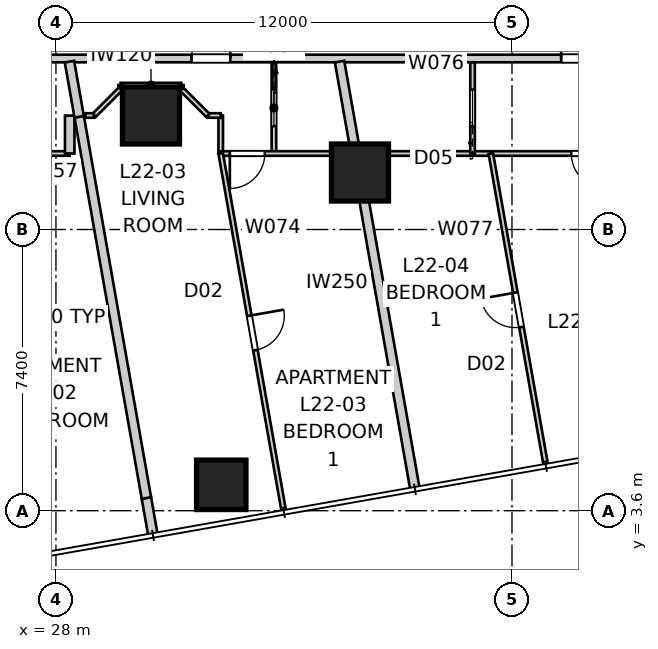
"""IFC4 building model, lengths in metres.
Left out: names, types, materials, properties, quantities, classifications, styles, units other than length and angle.
Written with IfcOpenShell. Run it as: python <this file> out.ifc"""

import sys

from ifc_helpers import new_model, si_unit, direction, frame, frame_2d, origin, origin_2d, place, context, subcontext, project, spatial, rectangle, extrude, element, fill, save


model = new_model("IFC4")
c1 = context("Model", 3, precision=1e-05, world=origin(), true_north=direction((0.0, 1.0)))
c2 = subcontext(c1, "Body", "Model", "MODEL_VIEW")
j1 = project(units=[si_unit("LENGTHUNIT", "METRE"), si_unit("PLANEANGLEUNIT", "RADIAN")], contexts=[c1])
p1 = place(None, origin())
s1 = spatial("IfcSite", under=j1, at=p1, CompositionType="ELEMENT")
p2 = place(p1, origin())
s2 = spatial("IfcBuilding", under=s1, at=p2, CompositionType="ELEMENT")
p3 = place(p2, frame((0.0, 0.0, 82.8)))
s3 = spatial("IfcBuildingStorey", under=s2, at=p3, CompositionType="ELEMENT", Elevation=82.8)
p4 = place(p3, frame((32.35, 4.281, 0.0), z_axis=(0.0, 0.0, 1.0), x_axis=(1.0, 0.0, 0.0)))
e1 = element("IfcColumn", 1, at=p4, inside=s3, PredefinedType="COLUMN", context=c2, shape_type="SweptSolid", body=[
    extrude(rectangle(XDim=1.3, YDim=1.3, at=origin_2d()), origin(), (0.0, 0.0, 1.0), 3.4),
])
for number, where, z_axis, x_axis in (
    (2, (30.5, 14.0, 0.0), (0.0, 0.0, 1.0), (1.0, 0.0, 0.0)),
    (3, (36.0, 12.5, 0.0), (0.0, 0.0, 1.0), (1.0, 0.0, 0.0)),
):
    element("IfcColumn", number, at=place(p3, frame(where, z_axis=z_axis, x_axis=x_axis)), inside=s3, PredefinedType="COLUMN", context=c2, shape_type="SweptSolid", body=[
        extrude(rectangle(XDim=1.5, YDim=1.5, at=origin_2d()), origin(), (0.0, 0.0, 1.0), 3.4),
    ])
p5 = place(p3, frame((25.5, 15.5, 0.0), z_axis=(0.0, 0.0, 1.0), x_axis=(1.0, 0.0, 0.0)))
e4 = element("IfcWall", 4, at=p5, inside=s3, PredefinedType="PARTITIONING", context=c2, shape_type="SweptSolid", body=[
    extrude(rectangle(XDim=29.0, YDim=0.2, at=frame_2d((14.5, 0.0))), origin(), (0.0, 0.0, 1.0), 3.25),
])
p6 = place(p5, frame((15.794, 0.0, 0.0)))
e5 = element("IfcOpeningElement", 5, at=p6, cuts=e4, PredefinedType="OPENING", context=c2, shape_type="SweptSolid", body=[
    extrude(rectangle(XDim=1.02, YDim=2.34, at=frame_2d((0.51, 1.17))), frame((0.0, 0.11, 0.0), z_axis=(0.0, -1.0, 0.0), x_axis=(1.0, 0.0, 0.0)), (0.0, 0.0, 1.0), 0.22),
])
p7 = place(p5, frame((6.067, 0.0, 0.0)))
e6 = element("IfcOpeningElement", 6, at=p7, cuts=e4, PredefinedType="OPENING", context=c2, shape_type="SweptSolid", body=[
    extrude(rectangle(XDim=1.02, YDim=2.34, at=frame_2d((0.51, 1.17))), frame((0.0, 0.11, 0.0), z_axis=(0.0, -1.0, 0.0), x_axis=(1.0, 0.0, 0.0)), (0.0, 0.0, 1.0), 0.22),
])
p8 = place(p5, frame((1.079, 0.0, 0.0)))
e7 = element("IfcOpeningElement", 7, at=p8, cuts=e4, PredefinedType="OPENING", context=c2, shape_type="SweptSolid", body=[
    extrude(rectangle(XDim=1.02, YDim=2.34, at=frame_2d((0.51, 1.17))), frame((0.0, 0.11, 0.0), z_axis=(0.0, -1.0, 0.0), x_axis=(1.0, 0.0, 0.0)), (0.0, 0.0, 1.0), 0.22),
])
p9 = place(p3, frame((37.448, 4.164, 0.0), z_axis=(0.0, 0.0, 1.0), x_axis=(-0.173635416642, 0.98481000304, 0.0)))
e8 = element("IfcWall", 8, at=p9, inside=s3, PredefinedType="PARTITIONING", context=c2, shape_type="SweptSolid", body=[
    extrude(rectangle(XDim=11.427, YDim=0.25, at=frame_2d((5.713, 0.0))), origin(), (0.0, 0.0, 1.0), 3.25),
])
p10 = place(p3, frame((30.554, 2.949, 0.0), z_axis=(0.0, 0.0, 1.0), x_axis=(-0.173813186416, 0.984778643263, 0.0)))
e9 = element("IfcWall", 9, at=p10, inside=s3, PredefinedType="PARTITIONING", context=c2, shape_type="SweptSolid", body=[
    extrude(rectangle(XDim=1.0, YDim=0.25, at=frame_2d((0.5, 0.0))), origin(), (0.0, 0.0, 1.0), 3.25),
])
p11 = place(p3, frame((30.38, 3.934, 0.0), z_axis=(0.0, 0.0, 1.0), x_axis=(-0.173644522411, 0.984808397525, 0.0)))
e10 = element("IfcWall", 10, at=p11, inside=s3, PredefinedType="PARTITIONING", context=c2, shape_type="SweptSolid", body=[
    extrude(rectangle(XDim=10.188, YDim=0.25, at=frame_2d((5.094, 0.0))), origin(), (0.0, 0.0, 1.0), 2.638),
])
p12 = place(p3, frame((28.611, 13.967, 0.0), z_axis=(0.0, 0.0, 1.0), x_axis=(-0.173634105885, 0.984810234143, 0.0)))
e11 = element("IfcWall", 11, at=p12, inside=s3, PredefinedType="PARTITIONING", context=c2, shape_type="SweptSolid", body=[
    extrude(rectangle(XDim=1.474, YDim=0.25, at=frame_2d((0.737, 0.0))), origin(), (0.0, 0.0, 1.0), 3.25),
])
p13 = place(p3, frame((28.362, 13.0, 0.0), z_axis=(0.0, 0.0, 1.0), x_axis=(-1.0, 0.0, 0.0)))
e12 = element("IfcWall", 12, at=p13, inside=s3, PredefinedType="PARTITIONING", context=c2, shape_type="SweptSolid", body=[
    extrude(rectangle(XDim=4.151, YDim=0.12, at=frame_2d((2.076, 0.0))), origin(), (0.0, 0.0, 1.0), 2.638),
])
p14 = place(p13, frame((1.76, 0.0, 0.0)))
e13 = element("IfcOpeningElement", 13, at=p14, cuts=e12, PredefinedType="OPENING", context=c2, shape_type="SweptSolid", body=[
    extrude(rectangle(XDim=0.92, YDim=2.34, at=frame_2d((0.46, 1.17))), frame((0.0, 0.07, 0.0), z_axis=(0.0, -1.0, 0.0), x_axis=(1.0, 0.0, 0.0)), (0.0, 0.0, 1.0), 0.14),
])
p15 = place(p3, frame((28.362, 13.998, 0.0), z_axis=(0.0, 0.0, 1.0), x_axis=(0.0, -1.0, 0.0)))
e14 = element("IfcWall", 14, at=p15, inside=s3, PredefinedType="PARTITIONING", context=c2, shape_type="SweptSolid", body=[
    extrude(rectangle(XDim=0.998, YDim=0.25, at=frame_2d((0.499, 0.0))), origin(), (0.0, 0.0, 1.0), 3.25),
])
p16 = place(p3, frame((33.736, 15.4, 0.0), z_axis=(0.0, 0.0, 1.0), x_axis=(0.0, -1.0, 0.0)))
e15 = element("IfcWall", 15, at=p16, inside=s3, PredefinedType="PARTITIONING", context=c2, shape_type="SweptSolid", body=[
    extrude(rectangle(XDim=2.4, YDim=0.12, at=frame_2d((1.2, 0.0))), origin(), (0.0, 0.0, 1.0), 3.25),
])
p17 = place(p16, frame((0.72, 0.0, 0.0)))
e16 = element("IfcOpeningElement", 16, at=p17, cuts=e15, PredefinedType="OPENING", context=c2, shape_type="SweptSolid", body=[
    extrude(rectangle(XDim=0.96, YDim=2.1, at=frame_2d((0.48, 1.05))), frame((0.0, 0.07, 0.0), z_axis=(0.0, -1.0, 0.0), x_axis=(1.0, 0.0, 0.0)), (0.0, 0.0, 1.0), 0.14),
])
p18 = place(p3, frame((32.336, 13.0, 0.0), z_axis=(0.0, 0.0, 1.0), x_axis=(0.0, 1.0, 0.0)))
e17 = element("IfcWall", 17, at=p18, inside=s3, PredefinedType="PARTITIONING", context=c2, shape_type="SweptSolid", body=[
    extrude(rectangle(XDim=1.0, YDim=0.12, at=frame_2d((0.5, 0.0))), origin(), (0.0, 0.0, 1.0), 3.25),
])
p19 = place(p3, frame((32.336, 14.0, 0.0), z_axis=(0.0, 0.0, 1.0), x_axis=(-1.0, 0.0, 0.0)))
e18 = element("IfcWall", 18, at=p19, inside=s3, PredefinedType="PARTITIONING", context=c2, shape_type="SweptSolid", body=[
    extrude(rectangle(XDim=0.336, YDim=0.12, at=frame_2d((0.168, 0.0))), origin(), (0.0, 0.0, 1.0), 3.25),
])
p20 = place(p3, frame((32.0, 14.0, 0.0), z_axis=(0.0, 0.0, 1.0), x_axis=(-0.707106781187, 0.707106781187, 0.0)))
e19 = element("IfcWall", 19, at=p20, inside=s3, PredefinedType="PARTITIONING", context=c2, shape_type="SweptSolid", body=[
    extrude(rectangle(XDim=0.99, YDim=0.12, at=frame_2d((0.495, 0.0))), origin(), (0.0, 0.0, 1.0), 3.25),
])
p21 = place(p3, frame((31.3, 14.8, 0.0), z_axis=(0.0, 0.0, 1.0), x_axis=(-1.0, 0.0, 0.0)))
e20 = element("IfcWall", 20, at=p21, inside=s3, PredefinedType="PARTITIONING", context=c2, shape_type="SweptSolid", body=[
    extrude(rectangle(XDim=1.6, YDim=0.12, at=frame_2d((0.8, 0.0))), origin(), (0.0, 0.0, 1.0), 3.25),
])
p22 = place(p3, frame((29.7, 14.7, 0.0), z_axis=(0.0, 0.0, 1.0), x_axis=(-0.707106781187, -0.707106781187, 0.0)))
e21 = element("IfcWall", 21, at=p22, inside=s3, PredefinedType="PARTITIONING", context=c2, shape_type="SweptSolid", body=[
    extrude(rectangle(XDim=0.99, YDim=0.12, at=frame_2d((0.495, 0.0))), origin(), (0.0, 0.0, 1.0), 3.25),
])
p23 = place(p3, frame((29.0, 14.0, 0.0), z_axis=(0.0, 0.0, 1.0), x_axis=(-1.0, 0.0, 0.0)))
e22 = element("IfcWall", 22, at=p23, inside=s3, PredefinedType="PARTITIONING", context=c2, shape_type="SweptSolid", body=[
    extrude(rectangle(XDim=0.219, YDim=0.12, at=frame_2d((0.109, 0.0))), origin(), (0.0, 0.0, 1.0), 3.25),
])
p24 = place(p3, frame((50.105, 13.0, 0.0), z_axis=(0.0, 0.0, 1.0), x_axis=(-1.0, 0.0, 0.0)))
e23 = element("IfcWall", 23, at=p24, inside=s3, PredefinedType="PARTITIONING", context=c2, shape_type="SweptSolid", body=[
    extrude(rectangle(XDim=17.77, YDim=0.12, at=frame_2d((8.885, 0.0))), origin(), (0.0, 0.0, 1.0), 2.55),
])
p25 = place(p24, frame((7.626, 0.0, 0.0)))
e24 = element("IfcOpeningElement", 24, at=p25, cuts=e23, PredefinedType="OPENING", context=c2, shape_type="SweptSolid", body=[
    extrude(rectangle(XDim=0.92, YDim=2.34, at=frame_2d((0.46, 1.17))), frame((0.0, 0.07, 0.0), z_axis=(0.0, -1.0, 0.0), x_axis=(1.0, 0.0, 0.0)), (0.0, 0.0, 1.0), 0.14),
])
p26 = place(p24, frame((16.61, 0.0, 0.0)))
e25 = element("IfcOpeningElement", 25, at=p26, cuts=e23, PredefinedType="OPENING", context=c2, shape_type="SweptSolid", body=[
    extrude(rectangle(XDim=0.92, YDim=2.34, at=frame_2d((0.46, 1.17))), frame((0.0, 0.07, 0.0), z_axis=(0.0, -1.0, 0.0), x_axis=(1.0, 0.0, 0.0)), (0.0, 0.0, 1.0), 0.14),
])
p27 = place(p3, frame((32.336, 13.0, 0.0), z_axis=(0.0, 0.0, 1.0), x_axis=(0.173624894944, -0.984811858101, 0.0)))
e26 = element("IfcWall", 26, at=p27, inside=s3, PredefinedType="PARTITIONING", context=c2, shape_type="SweptSolid", body=[
    extrude(rectangle(XDim=9.549, YDim=0.12, at=frame_2d((4.774, 0.0))), origin(), (0.0, 0.0, 1.0), 3.25),
])
p28 = place(p27, frame((4.334, 0.0, 0.0)))
e27 = element("IfcOpeningElement", 27, at=p28, cuts=e26, PredefinedType="OPENING", context=c2, shape_type="SweptSolid", body=[
    extrude(rectangle(XDim=0.92, YDim=2.34, at=frame_2d((0.46, 1.17))), frame((0.0, 0.07, 0.0), z_axis=(0.0, -1.0, 0.0), x_axis=(1.0, 0.0, 0.0)), (0.0, 0.0, 1.0), 0.14),
])
p29 = place(p3, frame((38.962, 13.0, 0.0), z_axis=(0.0, 0.0, 1.0), x_axis=(0.0, 1.0, 0.0)))
e28 = element("IfcWall", 28, at=p29, inside=s3, PredefinedType="PARTITIONING", context=c2, shape_type="SweptSolid", body=[
    extrude(rectangle(XDim=2.4, YDim=0.12, at=frame_2d((1.2, 0.0))), origin(), (0.0, 0.0, 1.0), 3.25),
])
p30 = place(p29, frame((0.72, 0.0, 0.0)))
e29 = element("IfcOpeningElement", 29, at=p30, cuts=e28, PredefinedType="OPENING", context=c2, shape_type="SweptSolid", body=[
    extrude(rectangle(XDim=0.96, YDim=2.1, at=frame_2d((0.48, 1.05))), frame((0.0, 0.07, 0.0), z_axis=(0.0, -1.0, 0.0), x_axis=(1.0, 0.0, 0.0)), (0.0, 0.0, 1.0), 0.14),
])
p31 = place(p3, frame((40.887, 4.812, 0.0), z_axis=(0.0, 0.0, 1.0), x_axis=(-0.173647980238, 0.984807787824, 0.0)))
e30 = element("IfcWall", 30, at=p31, inside=s3, PredefinedType="PARTITIONING", context=c2, shape_type="SweptSolid", body=[
    extrude(rectangle(XDim=8.315, YDim=0.12, at=frame_2d((4.157, 0.0))), origin(), (0.0, 0.0, 1.0), 3.25),
])
p32 = place(p31, frame((3.677, 0.0, 0.0)))
e31 = element("IfcOpeningElement", 31, at=p32, cuts=e30, PredefinedType="OPENING", context=c2, shape_type="SweptSolid", body=[
    extrude(rectangle(XDim=0.92, YDim=2.34, at=frame_2d((0.46, 1.17))), frame((0.0, 0.07, 0.0), z_axis=(0.0, -1.0, 0.0), x_axis=(1.0, 0.0, 0.0)), (0.0, 0.0, 1.0), 0.14),
])
for number, where, z_axis, x_axis in (
    (32, (31.3, 14.8, 0.0), (0.0, 0.0, 1.0), (0.0, -1.0, 0.0)),
    (33, (29.7, 14.8, 0.0), (0.0, 0.0, 1.0), (0.0, -1.0, 0.0)),
):
    element("IfcWall", number, at=place(p3, frame(where, z_axis=z_axis, x_axis=x_axis)), inside=s3, PredefinedType="PARTITIONING", context=c2, shape_type="SweptSolid", body=[
        extrude(rectangle(XDim=0.1, YDim=0.12, at=frame_2d((0.05, 0.0))), origin(), (0.0, 0.0, 1.0), 3.25),
    ])
p33 = place(p6, origin())
e34 = element("IfcDoor", 34, at=p33, inside=s3, OperationType="SINGLE_SWING_LEFT", PredefinedType="DOOR", context=c2, shape_type="SweptSolid", body=[
    extrude(rectangle(XDim=1.02, YDim=2.34, at=frame_2d((0.51, 1.17))), frame((0.0, 0.025, 0.0), z_axis=(0.0, -1.0, 0.0), x_axis=(1.0, 0.0, 0.0)), (0.0, 0.0, 1.0), 0.05),
])
fill(e5, e34)
p34 = place(p7, origin())
e35 = element("IfcDoor", 35, at=p34, inside=s3, OperationType="SINGLE_SWING_RIGHT", PredefinedType="DOOR", context=c2, shape_type="SweptSolid", body=[
    extrude(rectangle(XDim=1.02, YDim=2.34, at=frame_2d((0.51, 1.17))), frame((0.0, 0.025, 0.0), z_axis=(0.0, -1.0, 0.0), x_axis=(1.0, 0.0, 0.0)), (0.0, 0.0, 1.0), 0.05),
])
fill(e6, e35)
p35 = place(p25, origin())
e36 = element("IfcDoor", 36, at=p35, inside=s3, OperationType="SINGLE_SWING_LEFT", PredefinedType="DOOR", context=c2, shape_type="SweptSolid", body=[
    extrude(rectangle(XDim=0.92, YDim=2.34, at=frame_2d((0.46, 1.17))), frame((0.0, 0.025, 0.0), z_axis=(0.0, -1.0, 0.0), x_axis=(1.0, 0.0, 0.0)), (0.0, 0.0, 1.0), 0.05),
])
fill(e24, e36)
p36 = place(p30, origin())
e37 = element("IfcDoor", 37, at=p36, inside=s3, OperationType="SLIDING_TO_LEFT", PredefinedType="DOOR", context=c2, shape_type="SweptSolid", body=[
    extrude(rectangle(XDim=0.96, YDim=2.1, at=frame_2d((0.48, 1.05))), frame((0.0, 0.025, 0.0), z_axis=(0.0, -1.0, 0.0), x_axis=(1.0, 0.0, 0.0)), (0.0, 0.0, 1.0), 0.05),
])
fill(e29, e37)
p37 = place(p17, origin())
e38 = element("IfcDoor", 38, at=p37, inside=s3, OperationType="SLIDING_TO_LEFT", PredefinedType="DOOR", context=c2, shape_type="SweptSolid", body=[
    extrude(rectangle(XDim=0.96, YDim=2.1, at=frame_2d((0.48, 1.05))), frame((0.0, 0.025, 0.0), z_axis=(0.0, -1.0, 0.0), x_axis=(1.0, 0.0, 0.0)), (0.0, 0.0, 1.0), 0.05),
])
fill(e16, e38)
p38 = place(p26, origin())
e39 = element("IfcDoor", 39, at=p38, inside=s3, OperationType="SINGLE_SWING_RIGHT", PredefinedType="DOOR", context=c2, shape_type="SweptSolid", body=[
    extrude(rectangle(XDim=0.92, YDim=2.34, at=frame_2d((0.46, 1.17))), frame((0.0, 0.025, 0.0), z_axis=(0.0, -1.0, 0.0), x_axis=(1.0, 0.0, 0.0)), (0.0, 0.0, 1.0), 0.05),
])
fill(e25, e39)
p39 = place(p32, origin())
e40 = element("IfcDoor", 40, at=p39, inside=s3, OperationType="SINGLE_SWING_RIGHT", PredefinedType="DOOR", context=c2, shape_type="SweptSolid", body=[
    extrude(rectangle(XDim=0.92, YDim=2.34, at=frame_2d((0.46, 1.17))), frame((0.0, 0.025, 0.0), z_axis=(0.0, -1.0, 0.0), x_axis=(1.0, 0.0, 0.0)), (0.0, 0.0, 1.0), 0.05),
])
fill(e31, e40)
p40 = place(p28, origin())
e41 = element("IfcDoor", 41, at=p40, inside=s3, OperationType="SINGLE_SWING_LEFT", PredefinedType="DOOR", context=c2, shape_type="SweptSolid", body=[
    extrude(rectangle(XDim=0.92, YDim=2.34, at=frame_2d((0.46, 1.17))), frame((0.0, 0.025, 0.0), z_axis=(0.0, -1.0, 0.0), x_axis=(1.0, 0.0, 0.0)), (0.0, 0.0, 1.0), 0.05),
])
fill(e27, e41)
save(model, sys.argv[1])
